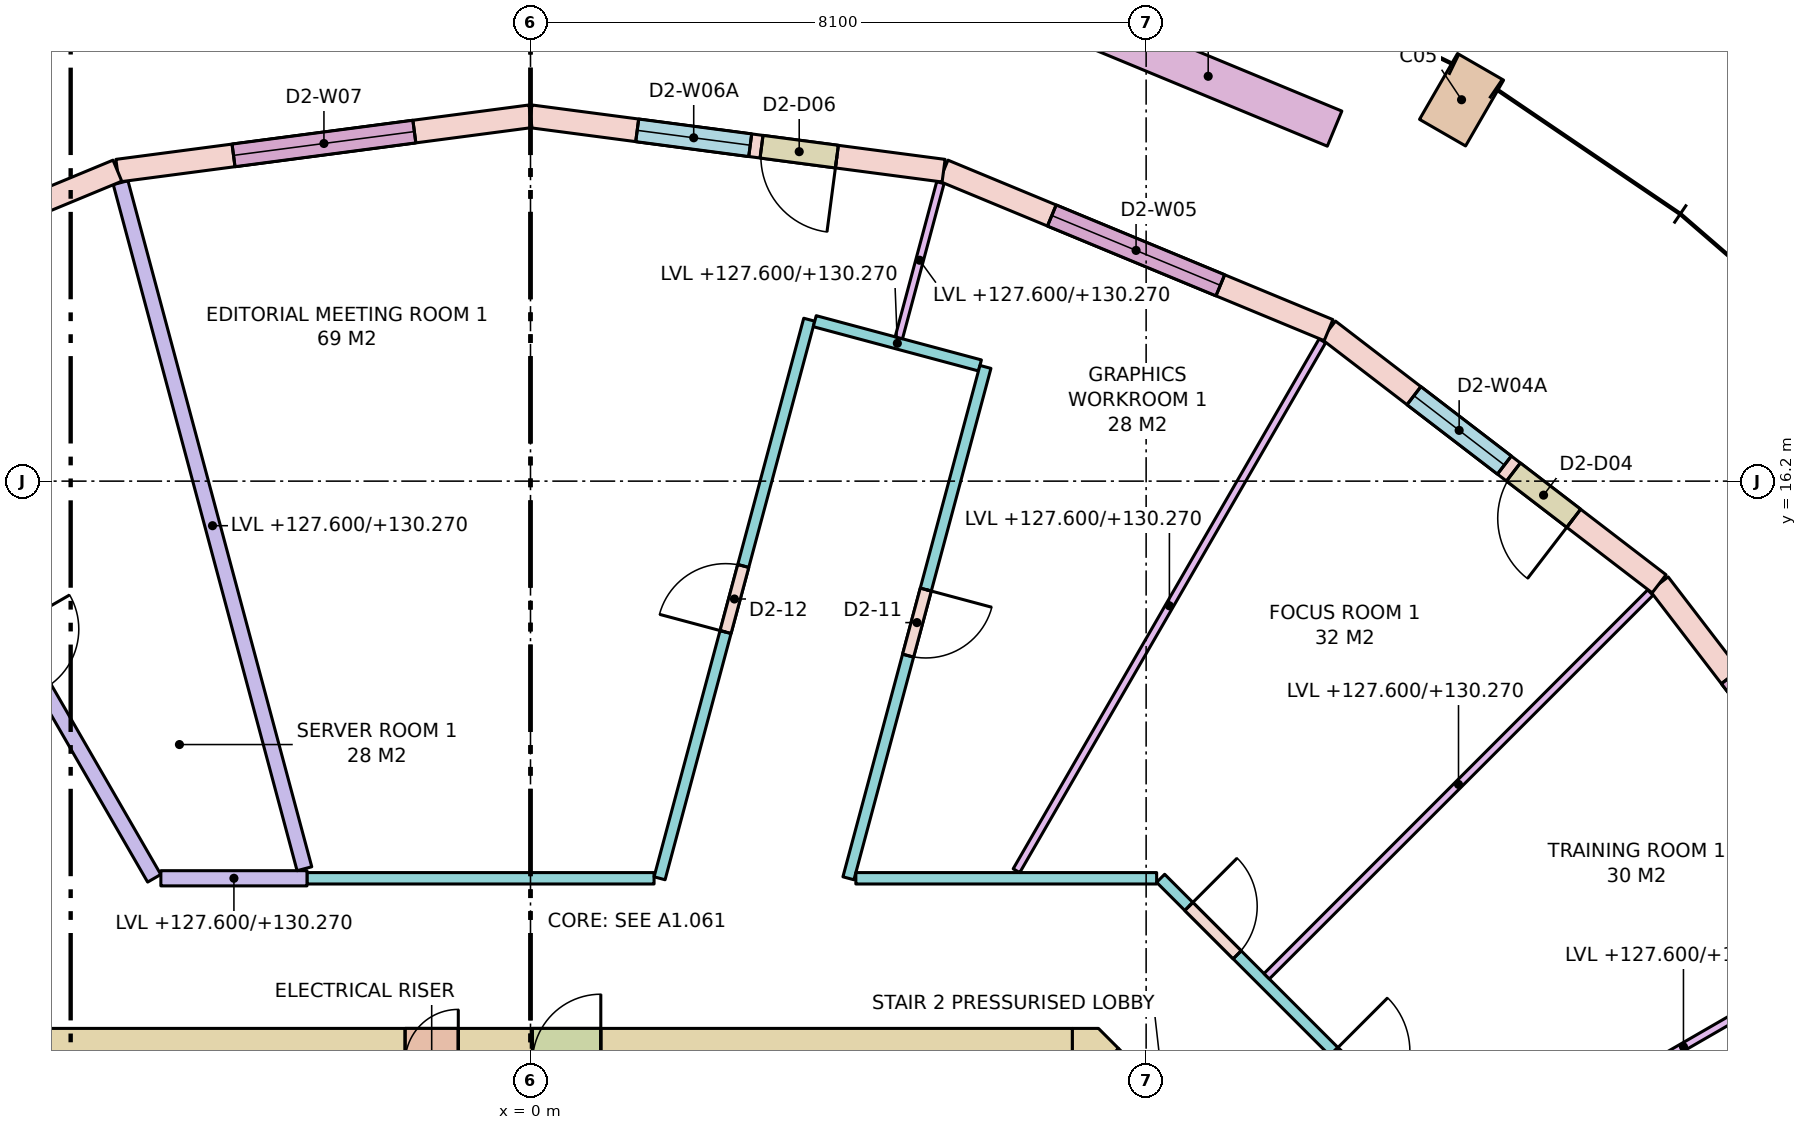
"""IFC4 building model, lengths in metres.
Left out: names, types, materials, properties, quantities, classifications, styles, units other than length and angle.
Written with IfcOpenShell. Run it as: python <this file> out.ifc"""

import sys

from ifc_helpers import new_model, si_unit, direction, frame, frame_2d, origin, origin_2d, place, context, subcontext, project, spatial, polyline, rectangle, outline, extrude, element, fill, save


model = new_model("IFC4")
c1 = context("Model", 3, precision=1e-05, world=origin(), true_north=direction((0.0, 1.0)))
c2 = subcontext(c1, "Body", "Model", "MODEL_VIEW")
j1 = project(units=[si_unit("LENGTHUNIT", "METRE"), si_unit("PLANEANGLEUNIT", "RADIAN")], contexts=[c1])
p1 = place(None, origin())
s1 = spatial("IfcSite", under=j1, at=p1, CompositionType="ELEMENT")
p2 = place(p1, origin())
s2 = spatial("IfcBuilding", under=s1, at=p2, CompositionType="ELEMENT")
p3 = place(p2, frame((0.0, 0.0, 127.6)))
s3 = spatial("IfcBuildingStorey", under=s2, at=p3, CompositionType="ELEMENT", Elevation=127.6)
p4 = place(p3, frame((12.25, 21.218, 0.0), z_axis=(0.0, 0.0, 1.0), x_axis=(-0.866025403784, 0.5, 0.0)))
e1 = element("IfcColumn", 1, at=p4, inside=s3, PredefinedType="COLUMN", context=c2, shape_type="SweptSolid", body=[
    extrude(rectangle(XDim=0.7, YDim=1.0, at=origin_2d()), origin(), (0.0, 0.0, 1.0), 3.8),
])
p5 = place(p3, frame((-7.13, 8.55, -0.28), z_axis=(0.0, 0.0, 1.0), x_axis=(1.0, 0.0, 0.0)))
e2 = element("IfcWall", 2, at=p5, inside=s3, PredefinedType="SHEAR", context=c2, shape_type="SweptSolid", body=[
    extrude(rectangle(XDim=14.26, YDim=0.9, at=frame_2d((7.13, 0.0))), origin(), (0.0, 0.0, 1.0), 3.8),
])
p6 = place(p5, frame((5.48, 0.0, 0.28)))
e3 = element("IfcOpeningElement", 3, at=p6, cuts=e2, PredefinedType="OPENING", context=c2, shape_type="SweptSolid", body=[
    extrude(rectangle(XDim=0.7, YDim=2.1, at=frame_2d((0.35, 1.05))), frame((0.0, 0.46, 0.0), z_axis=(0.0, -1.0, 0.0), x_axis=(1.0, 0.0, 0.0)), (0.0, 0.0, 1.0), 0.92),
])
p7 = place(p5, frame((7.155, 0.0, 0.28)))
e4 = element("IfcOpeningElement", 4, at=p7, cuts=e2, PredefinedType="OPENING", context=c2, shape_type="SweptSolid", body=[
    extrude(rectangle(XDim=0.9, YDim=2.1, at=frame_2d((0.45, 1.05))), frame((0.0, 0.46, 0.0), z_axis=(0.0, -1.0, 0.0), x_axis=(1.0, 0.0, 0.0)), (0.0, 0.0, 1.0), 0.92),
])
p8 = place(p3, frame((7.418, 8.418, -0.28), z_axis=(0.0, 0.0, 1.0), x_axis=(0.707106781187, -0.707106781187, 0.0)))
e5 = element("IfcWall", 5, at=p8, inside=s3, PredefinedType="SHEAR", context=c2, shape_type="SweptSolid", body=[
    extrude(rectangle(XDim=4.243, YDim=0.9, at=frame_2d((2.121, 0.0))), origin(), (0.0, 0.0, 1.0), 3.8),
])
p9 = place(p8, frame((2.393, 0.0, 0.28)))
e6 = element("IfcOpeningElement", 6, at=p9, cuts=e5, PredefinedType="OPENING", context=c2, shape_type="SweptSolid", body=[
    extrude(rectangle(XDim=1.2, YDim=2.1, at=frame_2d((0.6, 1.05))), frame((0.0, 0.46, 0.0), z_axis=(0.0, -1.0, 0.0), x_axis=(1.0, 0.0, 0.0)), (0.0, 0.0, 1.0), 0.92),
])
p10 = place(p3, frame((0.0, 0.0, -0.28)))
e7 = element("IfcWall", 7, at=p10, inside=s3, PredefinedType="SHEAR", context=c2, shape_type="SweptSolid", body=[
    extrude(outline(polyline([(7.473, 9.0), (7.736, 8.736), (7.13, 8.13), (7.13, 9.0), (7.473, 9.0)])), origin(), (0.0, 0.0, 1.0), 3.8),
])
p11 = place(p3, frame((18.187, 10.5, 0.0), z_axis=(0.0, 0.0, 1.0), x_axis=(-0.608784891166, 0.793335336593, 0.0)))
e8 = element("IfcWall", 8, at=p11, inside=s3, PredefinedType="STANDARD", context=c2, shape_type="SweptSolid", body=[
    extrude(rectangle(XDim=5.482, YDim=0.3, at=frame_2d((2.741, 0.0))), origin(), (0.0, 0.0, 1.0), 3.52),
])
p12 = place(p11, frame((1.541, 0.0, 0.8)))
e9 = element("IfcOpeningElement", 9, at=p12, cuts=e8, PredefinedType="OPENING", context=c2, shape_type="SweptSolid", body=[
    extrude(rectangle(XDim=2.4, YDim=2.5, at=frame_2d((1.2, 1.25))), frame((0.0, 0.16, 0.0), z_axis=(0.0, -1.0, 0.0), x_axis=(1.0, 0.0, 0.0)), (0.0, 0.0, 1.0), 0.32),
])
p13 = place(p3, frame((14.849, 14.849, 0.0), z_axis=(0.0, 0.0, 1.0), x_axis=(-0.793335336593, 0.608784891166, 0.0)))
e10 = element("IfcWall", 10, at=p13, inside=s3, PredefinedType="STANDARD", context=c2, shape_type="SweptSolid", body=[
    extrude(rectangle(XDim=5.482, YDim=0.3, at=frame_2d((2.741, 0.0))), origin(), (0.0, 0.0, 1.0), 3.52),
])
p14 = place(p13, frame((1.416, 0.0, 0.0)))
e11 = element("IfcOpeningElement", 11, at=p14, cuts=e10, PredefinedType="OPENING", context=c2, shape_type="SweptSolid", body=[
    extrude(rectangle(XDim=1.0, YDim=2.4, at=frame_2d((0.5, 1.2))), frame((0.0, 0.16, 0.0), z_axis=(0.0, -1.0, 0.0), x_axis=(1.0, 0.0, 0.0)), (0.0, 0.0, 1.0), 0.32),
])
p15 = place(p13, frame((2.566, 0.0, 0.8)))
e12 = element("IfcOpeningElement", 12, at=p15, cuts=e10, PredefinedType="OPENING", context=c2, shape_type="SweptSolid", body=[
    extrude(rectangle(XDim=1.5, YDim=2.5, at=frame_2d((0.75, 1.25))), frame((0.0, 0.16, 0.0), z_axis=(0.0, -1.0, 0.0), x_axis=(1.0, 0.0, 0.0)), (0.0, 0.0, 1.0), 0.32),
])
p16 = place(p3, frame((10.5, 18.187, 0.0), z_axis=(0.0, 0.0, 1.0), x_axis=(-0.923877333662, 0.382688740813, 0.0)))
e13 = element("IfcWall", 13, at=p16, inside=s3, PredefinedType="STANDARD", context=c2, shape_type="SweptSolid", body=[
    extrude(rectangle(XDim=5.482, YDim=0.3, at=frame_2d((2.741, 0.0))), origin(), (0.0, 0.0, 1.0), 3.52),
])
p17 = place(p16, frame((1.541, 0.0, 0.8)))
e14 = element("IfcOpeningElement", 14, at=p17, cuts=e13, PredefinedType="OPENING", context=c2, shape_type="SweptSolid", body=[
    extrude(rectangle(XDim=2.4, YDim=2.5, at=frame_2d((1.2, 1.25))), frame((0.0, 0.16, 0.0), z_axis=(0.0, -1.0, 0.0), x_axis=(1.0, 0.0, 0.0)), (0.0, 0.0, 1.0), 0.32),
])
p18 = place(p3, frame((5.435, 20.284, 0.0), z_axis=(0.0, 0.0, 1.0), x_axis=(-0.991444743541, 0.130527087244, 0.0)))
e15 = element("IfcWall", 15, at=p18, inside=s3, PredefinedType="STANDARD", context=c2, shape_type="SweptSolid", body=[
    extrude(rectangle(XDim=5.482, YDim=0.3, at=frame_2d((2.741, 0.0))), origin(), (0.0, 0.0, 1.0), 3.52),
])
p19 = place(p18, frame((1.416, 0.0, 0.0)))
e16 = element("IfcOpeningElement", 16, at=p19, cuts=e15, PredefinedType="OPENING", context=c2, shape_type="SweptSolid", body=[
    extrude(rectangle(XDim=1.0, YDim=2.4, at=frame_2d((0.5, 1.2))), frame((0.0, 0.16, 0.0), z_axis=(0.0, -1.0, 0.0), x_axis=(1.0, 0.0, 0.0)), (0.0, 0.0, 1.0), 0.32),
])
p20 = place(p18, frame((2.566, 0.0, 0.8)))
e17 = element("IfcOpeningElement", 17, at=p20, cuts=e15, PredefinedType="OPENING", context=c2, shape_type="SweptSolid", body=[
    extrude(rectangle(XDim=1.5, YDim=2.5, at=frame_2d((0.75, 1.25))), frame((0.0, 0.16, 0.0), z_axis=(0.0, -1.0, 0.0), x_axis=(1.0, 0.0, 0.0)), (0.0, 0.0, 1.0), 0.32),
])
p21 = place(p3, frame((0.0, 21.0, 0.0), z_axis=(0.0, 0.0, 1.0), x_axis=(-0.991444743541, -0.130527087244, 0.0)))
e18 = element("IfcWall", 18, at=p21, inside=s3, PredefinedType="STANDARD", context=c2, shape_type="SweptSolid", body=[
    extrude(rectangle(XDim=5.482, YDim=0.3, at=frame_2d((2.741, 0.0))), origin(), (0.0, 0.0, 1.0), 3.52),
])
p22 = place(p21, frame((1.541, 0.0, 0.8)))
e19 = element("IfcOpeningElement", 19, at=p22, cuts=e18, PredefinedType="OPENING", context=c2, shape_type="SweptSolid", body=[
    extrude(rectangle(XDim=2.4, YDim=2.5, at=frame_2d((1.2, 1.25))), frame((0.0, 0.16, 0.0), z_axis=(0.0, -1.0, 0.0), x_axis=(1.0, 0.0, 0.0)), (0.0, 0.0, 1.0), 0.32),
])
p23 = place(p3, frame((-5.435, 20.284, 0.0), z_axis=(0.0, 0.0, 1.0), x_axis=(-0.923877333662, -0.382688740813, 0.0)))
e20 = element("IfcWall", 20, at=p23, inside=s3, PredefinedType="STANDARD", context=c2, shape_type="SweptSolid", body=[
    extrude(rectangle(XDim=5.482, YDim=0.3, at=frame_2d((2.741, 0.0))), origin(), (0.0, 0.0, 1.0), 3.52),
])
p24 = place(p23, frame((1.416, 0.0, 0.0)))
e21 = element("IfcOpeningElement", 21, at=p24, cuts=e20, PredefinedType="OPENING", context=c2, shape_type="SweptSolid", body=[
    extrude(rectangle(XDim=1.0, YDim=2.4, at=frame_2d((0.5, 1.2))), frame((0.0, 0.16, 0.0), z_axis=(0.0, -1.0, 0.0), x_axis=(1.0, 0.0, 0.0)), (0.0, 0.0, 1.0), 0.32),
])
p25 = place(p23, frame((2.566, 0.0, 0.8)))
e22 = element("IfcOpeningElement", 22, at=p25, cuts=e20, PredefinedType="OPENING", context=c2, shape_type="SweptSolid", body=[
    extrude(rectangle(XDim=1.5, YDim=2.5, at=frame_2d((0.75, 1.25))), frame((0.0, 0.16, 0.0), z_axis=(0.0, -1.0, 0.0), x_axis=(1.0, 0.0, 0.0)), (0.0, 0.0, 1.0), 0.32),
])
p26 = place(p3, frame((10.58, 20.838, 0.0), z_axis=(0.0, 0.0, 1.0), x_axis=(-0.923909393783, 0.382611332921, 0.0)))
e23 = element("IfcWall", 23, at=p26, inside=s3, PredefinedType="PARAPET", context=c2, shape_type="SweptSolid", body=[
    extrude(rectangle(XDim=3.6, YDim=0.5, at=frame_2d((1.8, 0.0))), origin(), (0.0, 0.0, 1.0), 0.9),
])
p27 = place(p3, frame((-8.285, 16.75, 0.0), z_axis=(0.0, 0.0, 1.0), x_axis=(0.500021399824, -0.866013048238, 0.0)))
e24 = element("IfcWall", 24, at=p27, inside=s3, PredefinedType="PARTITIONING", context=c2, shape_type="SweptSolid", body=[
    extrude(rectangle(XDim=6.669, YDim=0.2, at=frame_2d((3.334, 0.0))), origin(), (0.0, 0.0, 1.0), 3.52),
])
p28 = place(p27, frame((2.884, 0.0, 0.0)))
e25 = element("IfcOpeningElement", 25, at=p28, cuts=e24, PredefinedType="OPENING", context=c2, shape_type="SweptSolid", body=[
    extrude(rectangle(XDim=0.9, YDim=2.1, at=frame_2d((0.45, 1.05))), frame((0.0, 0.11, 0.0), z_axis=(0.0, -1.0, 0.0), x_axis=(1.0, 0.0, 0.0)), (0.0, 0.0, 1.0), 0.22),
])
p29 = place(p3, frame((-4.863, 10.975, 0.0), z_axis=(0.0, 0.0, 1.0), x_axis=(1.0, 0.0, 0.0)))
e26 = element("IfcWall", 26, at=p29, inside=s3, PredefinedType="PARTITIONING", context=c2, shape_type="SweptSolid", body=[
    extrude(rectangle(XDim=1.923, YDim=0.2, at=frame_2d((0.961, 0.0))), origin(), (0.0, 0.0, 1.0), 2.67),
])
p30 = place(p3, frame((-2.941, 10.975, 0.0), z_axis=(0.0, 0.0, 1.0), x_axis=(1.0, 0.0, 0.0)))
e27 = element("IfcWall", 27, at=p30, inside=s3, PredefinedType="PARTITIONING", context=c2, shape_type="SweptSolid", body=[
    extrude(rectangle(XDim=4.567, YDim=0.15, at=frame_2d((2.283, 0.0))), origin(), (0.0, 0.0, 1.0), 2.67),
])
p31 = place(p3, frame((1.698, 10.975, 0.0), z_axis=(0.0, 0.0, 1.0), x_axis=(0.258810940308, 0.965927997926, 0.0)))
e28 = element("IfcWall", 28, at=p31, inside=s3, PredefinedType="PARTITIONING", context=c2, shape_type="SweptSolid", body=[
    extrude(rectangle(XDim=7.608, YDim=0.15, at=frame_2d((3.804, 0.0))), origin(), (0.0, 0.0, 1.0), 3.52),
])
p32 = place(p31, frame((3.354, 0.0, 0.0)))
e29 = element("IfcOpeningElement", 29, at=p32, cuts=e28, PredefinedType="OPENING", context=c2, shape_type="SweptSolid", body=[
    extrude(rectangle(XDim=0.9, YDim=2.1, at=frame_2d((0.45, 1.05))), frame((0.0, 0.085, 0.0), z_axis=(0.0, -1.0, 0.0), x_axis=(1.0, 0.0, 0.0)), (0.0, 0.0, 1.0), 0.17),
])
p33 = place(p3, frame((3.74, 18.304, 0.0), z_axis=(0.0, 0.0, 1.0), x_axis=(0.965933522054, -0.25879032241, 0.0)))
e30 = element("IfcWall", 30, at=p33, inside=s3, PredefinedType="PARTITIONING", context=c2, shape_type="SweptSolid", body=[
    extrude(rectangle(XDim=2.25, YDim=0.15, at=frame_2d((1.125, 0.0))), origin(), (0.0, 0.0, 1.0), 2.67),
])
p34 = place(p3, frame((5.986, 17.703, 0.0), z_axis=(0.0, 0.0, 1.0), x_axis=(-0.258831867169, -0.965922390535, 0.0)))
e31 = element("IfcWall", 31, at=p34, inside=s3, PredefinedType="PARTITIONING", context=c2, shape_type="SweptSolid", body=[
    extrude(rectangle(XDim=6.965, YDim=0.15, at=frame_2d((3.482, 0.0))), origin(), (0.0, 0.0, 1.0), 3.52),
])
p35 = place(p34, frame((3.032, 0.0, 0.0)))
e32 = element("IfcOpeningElement", 32, at=p35, cuts=e31, PredefinedType="OPENING", context=c2, shape_type="SweptSolid", body=[
    extrude(rectangle(XDim=0.9, YDim=2.1, at=frame_2d((0.45, 1.05))), frame((0.0, 0.085, 0.0), z_axis=(0.0, -1.0, 0.0), x_axis=(1.0, 0.0, 0.0)), (0.0, 0.0, 1.0), 0.17),
])
p36 = place(p3, frame((4.281, 10.975, 0.0), z_axis=(0.0, 0.0, 1.0), x_axis=(1.0, 0.0, 0.0)))
e33 = element("IfcWall", 33, at=p36, inside=s3, PredefinedType="PARTITIONING", context=c2, shape_type="SweptSolid", body=[
    extrude(rectangle(XDim=3.958, YDim=0.15, at=frame_2d((1.979, 0.0))), origin(), (0.0, 0.0, 1.0), 2.67),
])
p37 = place(p3, frame((8.291, 10.975, 0.0), z_axis=(0.0, 0.0, 1.0), x_axis=(0.707106781187, -0.707106781187, 0.0)))
e34 = element("IfcWall", 34, at=p37, inside=s3, PredefinedType="PARTITIONING", context=c2, shape_type="SweptSolid", body=[
    extrude(rectangle(XDim=6.624, YDim=0.15, at=frame_2d((3.312, 0.0))), origin(), (0.0, 0.0, 1.0), 2.67),
])
p38 = place(p37, frame((3.224, 0.0, 0.0)))
e35 = element("IfcOpeningElement", 35, at=p38, cuts=e34, PredefinedType="OPENING", context=c2, shape_type="SweptSolid", body=[
    extrude(rectangle(XDim=1.0, YDim=2.1, at=frame_2d((0.5, 1.05))), frame((0.0, 0.085, 0.0), z_axis=(0.0, -1.0, 0.0), x_axis=(1.0, 0.0, 0.0)), (0.0, 0.0, 1.0), 0.17),
])
p39 = place(p37, frame((0.524, 0.0, 0.0)))
e36 = element("IfcOpeningElement", 36, at=p39, cuts=e34, PredefinedType="OPENING", context=c2, shape_type="SweptSolid", body=[
    extrude(rectangle(XDim=0.9, YDim=2.1, at=frame_2d((0.45, 1.05))), frame((0.0, 0.085, 0.0), z_axis=(0.0, -1.0, 0.0), x_axis=(1.0, 0.0, 0.0)), (0.0, 0.0, 1.0), 0.17),
])
p40 = place(p3, frame((12.294, 7.098, 0.0), z_axis=(0.0, 0.0, 1.0), x_axis=(0.866010486135, 0.500025837236, 0.0)))
e37 = element("IfcWall", 37, at=p40, inside=s3, PredefinedType="PARTITIONING", context=c2, shape_type="SweptSolid", body=[
    extrude(rectangle(XDim=6.641, YDim=0.1, at=frame_2d((3.32, 0.0))), origin(), (0.0, 0.0, 1.0), 2.67),
])
p41 = place(p3, frame((9.686, 9.686, 0.0), z_axis=(0.0, 0.0, 1.0), x_axis=(0.707106781187, 0.707106781187, 0.0)))
e38 = element("IfcWall", 38, at=p41, inside=s3, PredefinedType="PARTITIONING", context=c2, shape_type="SweptSolid", body=[
    extrude(rectangle(XDim=7.139, YDim=0.1, at=frame_2d((3.569, 0.0))), origin(), (0.0, 0.0, 1.0), 2.67),
])
p42 = place(p3, frame((6.394, 11.075, 0.0), z_axis=(0.0, 0.0, 1.0), x_axis=(0.500024397361, 0.866011317503, 0.0)))
e39 = element("IfcWall", 39, at=p42, inside=s3, PredefinedType="PARTITIONING", context=c2, shape_type="SweptSolid", body=[
    extrude(rectangle(XDim=8.049, YDim=0.1, at=frame_2d((4.024, 0.0))), origin(), (0.0, 0.0, 1.0), 2.67),
])
p43 = place(p3, frame((4.846, 18.086, 0.0), z_axis=(0.0, 0.0, 1.0), x_axis=(0.258705282257, 0.965956301772, 0.0)))
e40 = element("IfcWall", 40, at=p43, inside=s3, PredefinedType="PARTITIONING", context=c2, shape_type="SweptSolid", body=[
    extrude(rectangle(XDim=2.113, YDim=0.1, at=frame_2d((1.057, 0.0))), origin(), (0.0, 0.0, 1.0), 2.67),
])
p44 = place(p3, frame((-2.974, 11.101, 0.0), z_axis=(0.0, 0.0, 1.0), x_axis=(-0.258810523233, 0.965928109677, 0.0)))
e41 = element("IfcWall", 41, at=p44, inside=s3, PredefinedType="PARTITIONING", context=c2, shape_type="SweptSolid", body=[
    extrude(rectangle(XDim=9.344, YDim=0.2, at=frame_2d((4.672, 0.0))), origin(), (0.0, 0.0, 1.0), 2.67),
])
p45 = place(p14, origin())
e42 = element("IfcDoor", 42, at=p45, inside=s3, OperationType="SINGLE_SWING_LEFT", PredefinedType="DOOR", context=c2, shape_type="SweptSolid", body=[
    extrude(rectangle(XDim=1.0, YDim=2.4, at=frame_2d((0.5, 1.2))), frame((0.0, 0.025, 0.0), z_axis=(0.0, -1.0, 0.0), x_axis=(1.0, 0.0, 0.0)), (0.0, 0.0, 1.0), 0.05),
])
fill(e11, e42)
p46 = place(p15, origin())
e43 = element("IfcWindow", 43, at=p46, inside=s3, PartitioningType="SINGLE_PANEL", PredefinedType="WINDOW", context=c2, shape_type="SweptSolid", body=[
    extrude(rectangle(XDim=1.5, YDim=2.5, at=frame_2d((0.75, 1.25))), frame((0.0, 0.03, 0.0), z_axis=(0.0, -1.0, 0.0), x_axis=(1.0, 0.0, 0.0)), (0.0, 0.0, 1.0), 0.06),
])
fill(e12, e43)
p47 = place(p17, origin())
e44 = element("IfcWindow", 44, at=p47, inside=s3, PartitioningType="SINGLE_PANEL", PredefinedType="WINDOW", context=c2, shape_type="SweptSolid", body=[
    extrude(rectangle(XDim=2.4, YDim=2.5, at=frame_2d((1.2, 1.25))), frame((0.0, 0.03, 0.0), z_axis=(0.0, -1.0, 0.0), x_axis=(1.0, 0.0, 0.0)), (0.0, 0.0, 1.0), 0.06),
])
fill(e14, e44)
p48 = place(p19, origin())
e45 = element("IfcDoor", 45, at=p48, inside=s3, OperationType="SINGLE_SWING_LEFT", PredefinedType="DOOR", context=c2, shape_type="SweptSolid", body=[
    extrude(rectangle(XDim=1.0, YDim=2.4, at=frame_2d((0.5, 1.2))), frame((0.0, 0.025, 0.0), z_axis=(0.0, -1.0, 0.0), x_axis=(1.0, 0.0, 0.0)), (0.0, 0.0, 1.0), 0.05),
])
fill(e16, e45)
p49 = place(p20, origin())
e46 = element("IfcWindow", 46, at=p49, inside=s3, PartitioningType="SINGLE_PANEL", PredefinedType="WINDOW", context=c2, shape_type="SweptSolid", body=[
    extrude(rectangle(XDim=1.5, YDim=2.5, at=frame_2d((0.75, 1.25))), frame((0.0, 0.03, 0.0), z_axis=(0.0, -1.0, 0.0), x_axis=(1.0, 0.0, 0.0)), (0.0, 0.0, 1.0), 0.06),
])
fill(e17, e46)
p50 = place(p22, origin())
e47 = element("IfcWindow", 47, at=p50, inside=s3, PartitioningType="SINGLE_PANEL", PredefinedType="WINDOW", context=c2, shape_type="SweptSolid", body=[
    extrude(rectangle(XDim=2.4, YDim=2.5, at=frame_2d((1.2, 1.25))), frame((0.0, 0.03, 0.0), z_axis=(0.0, -1.0, 0.0), x_axis=(1.0, 0.0, 0.0)), (0.0, 0.0, 1.0), 0.06),
])
fill(e19, e47)
p51 = place(p39, origin())
e48 = element("IfcDoor", 48, at=p51, inside=s3, OperationType="SINGLE_SWING_LEFT", PredefinedType="DOOR", context=c2, shape_type="SweptSolid", body=[
    extrude(rectangle(XDim=0.9, YDim=2.1, at=frame_2d((0.45, 1.05))), frame((0.0, 0.025, 0.0), z_axis=(0.0, -1.0, 0.0), x_axis=(1.0, 0.0, 0.0)), (0.0, 0.0, 1.0), 0.05),
])
fill(e36, e48)
p52 = place(p35, origin())
e49 = element("IfcDoor", 49, at=p52, inside=s3, OperationType="SINGLE_SWING_LEFT", PredefinedType="DOOR", context=c2, shape_type="SweptSolid", body=[
    extrude(rectangle(XDim=0.9, YDim=2.1, at=frame_2d((0.45, 1.05))), frame((0.0, 0.025, 0.0), z_axis=(0.0, -1.0, 0.0), x_axis=(1.0, 0.0, 0.0)), (0.0, 0.0, 1.0), 0.05),
])
fill(e32, e49)
p53 = place(p32, origin())
e50 = element("IfcDoor", 50, at=p53, inside=s3, OperationType="SINGLE_SWING_LEFT", PredefinedType="DOOR", context=c2, shape_type="SweptSolid", body=[
    extrude(rectangle(XDim=0.9, YDim=2.1, at=frame_2d((0.45, 1.05))), frame((0.0, 0.025, 0.0), z_axis=(0.0, -1.0, 0.0), x_axis=(1.0, 0.0, 0.0)), (0.0, 0.0, 1.0), 0.05),
])
fill(e29, e50)
save(model, sys.argv[1])
